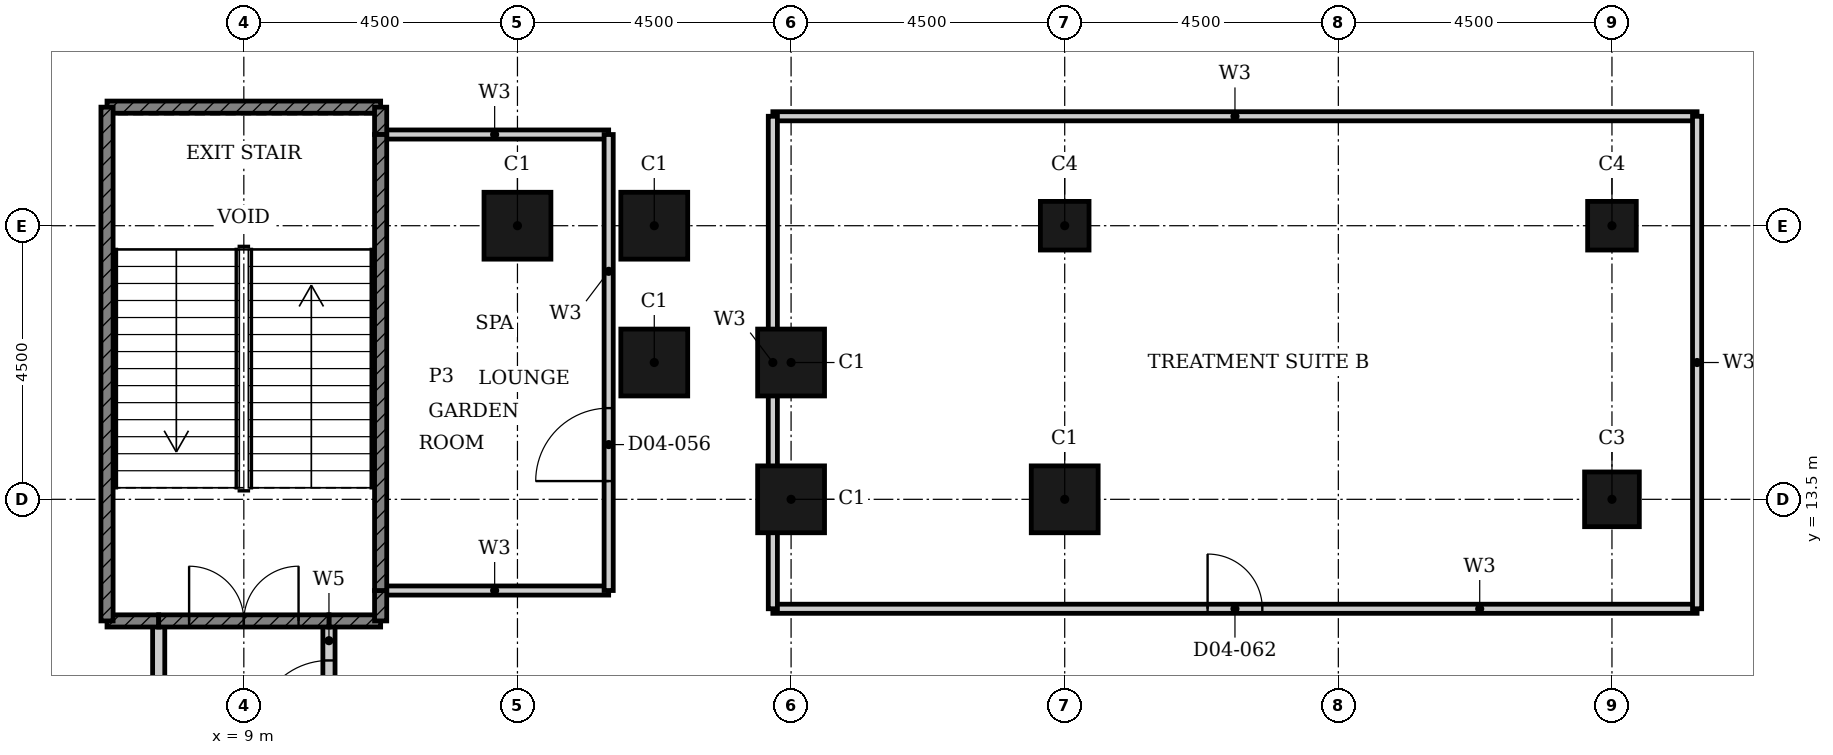
"""IFC4 building model, lengths in metres.
Left out: names, types, materials, properties, quantities, classifications, styles, units other than length and angle.
Written with IfcOpenShell. Run it as: python <this file> out.ifc"""

import sys

from ifc_helpers import new_model, si_unit, direction, frame, frame_2d, origin, origin_2d, place, context, subcontext, project, spatial, rectangle, hollow_rectangle, extrude, element, fill, save


model = new_model("IFC4")
c1 = context("Model", 3, precision=1e-05, world=origin(), true_north=direction((0.0, 1.0)))
c2 = subcontext(c1, "Body", "Model", "MODEL_VIEW")
j1 = project(units=[si_unit("LENGTHUNIT", "METRE"), si_unit("PLANEANGLEUNIT", "RADIAN")], contexts=[c1])
p1 = place(None, origin())
s1 = spatial("IfcSite", under=j1, at=p1, CompositionType="ELEMENT")
p2 = place(p1, origin())
s2 = spatial("IfcBuilding", under=s1, at=p2, CompositionType="ELEMENT")
p3 = place(p2, frame((0.0, 0.0, 24.0)))
s3 = spatial("IfcBuildingStorey", under=s2, at=p3, CompositionType="ELEMENT", Elevation=24.0)
for number, where, z_axis, x_axis in (
    (1, (13.5, 18.0, 0.0), (0.0, 0.0, 1.0), (1.0, 0.0, 0.0)),
    (2, (15.75, 18.0, 0.0), (0.0, 0.0, 1.0), (1.0, 0.0, 0.0)),
    (3, (15.75, 15.75, 0.0), (0.0, 0.0, 1.0), (1.0, 0.0, 0.0)),
    (4, (18.0, 15.75, 0.0), (0.0, 0.0, 1.0), (1.0, 0.0, 0.0)),
    (5, (18.0, 13.5, 0.0), (0.0, 0.0, 1.0), (1.0, 0.0, 0.0)),
    (6, (22.5, 13.5, 0.0), (0.0, 0.0, 1.0), (1.0, 0.0, 0.0)),
):
    element("IfcColumn", number, at=place(p3, frame(where, z_axis=z_axis, x_axis=x_axis)), inside=s3, PredefinedType="COLUMN", context=c2, shape_type="SweptSolid", body=[
        extrude(hollow_rectangle(XDim=1.1, YDim=1.1, WallThickness=0.036, at=origin_2d()), origin(), (0.0, 0.0, 1.0), 4.8),
    ])
p4 = place(p3, frame((31.5, 13.5, 0.0), z_axis=(0.0, 0.0, 1.0), x_axis=(1.0, 0.0, 0.0)))
e7 = element("IfcColumn", 7, at=p4, inside=s3, PredefinedType="COLUMN", context=c2, shape_type="SweptSolid", body=[
    extrude(hollow_rectangle(XDim=0.9, YDim=0.9, WallThickness=0.028, at=origin_2d()), origin(), (0.0, 0.0, 1.0), 4.8),
])
for number, where, z_axis, x_axis in (
    (8, (22.5, 18.0, 0.0), (0.0, 0.0, 1.0), (1.0, 0.0, 0.0)),
    (9, (31.5, 18.0, 0.0), (0.0, 0.0, 1.0), (1.0, 0.0, 0.0)),
):
    element("IfcColumn", number, at=place(p3, frame(where, z_axis=z_axis, x_axis=x_axis)), inside=s3, PredefinedType="COLUMN", context=c2, shape_type="SweptSolid", body=[
        extrude(hollow_rectangle(XDim=0.8, YDim=0.8, WallThickness=0.025, at=origin_2d()), origin(), (0.0, 0.0, 1.0), 4.8),
    ])
p5 = place(p3, frame((17.7, 11.7, 0.0), z_axis=(0.0, 0.0, 1.0), x_axis=(1.0, 0.0, 0.0)))
e10 = element("IfcWall", 10, at=p5, inside=s3, PredefinedType="PARTITIONING", context=c2, shape_type="SweptSolid", body=[
    extrude(rectangle(XDim=15.2, YDim=0.15, at=frame_2d((7.6, 0.0))), origin(), (0.0, 0.0, 1.0), 4.45),
])
p6 = place(p5, frame((7.15, 0.0, 0.0)))
e11 = element("IfcOpeningElement", 11, at=p6, cuts=e10, PredefinedType="OPENING", context=c2, shape_type="SweptSolid", body=[
    extrude(rectangle(XDim=0.9, YDim=2.1, at=frame_2d((0.45, 1.05))), frame((0.0, 0.085, 0.0), z_axis=(0.0, -1.0, 0.0), x_axis=(1.0, 0.0, 0.0)), (0.0, 0.0, 1.0), 0.17),
])
for number, where, z_axis, x_axis in (
    (12, (11.25, 12.0, 0.0), (0.0, 0.0, 1.0), (1.0, 0.0, 0.0)),
    (13, (11.25, 19.5, 0.0), (0.0, 0.0, 1.0), (1.0, 0.0, 0.0)),
):
    element("IfcWall", number, at=place(p3, frame(where, z_axis=z_axis, x_axis=x_axis)), inside=s3, PredefinedType="PARTITIONING", context=c2, shape_type="SweptSolid", body=[
        extrude(rectangle(XDim=3.75, YDim=0.15, at=frame_2d((1.875, 0.0))), origin(), (0.0, 0.0, 1.0), 4.45),
    ])
p7 = place(p3, frame((17.7, 19.8, 0.0), z_axis=(0.0, 0.0, 1.0), x_axis=(1.0, 0.0, 0.0)))
e14 = element("IfcWall", 14, at=p7, inside=s3, PredefinedType="PARTITIONING", context=c2, shape_type="SweptSolid", body=[
    extrude(rectangle(XDim=15.2, YDim=0.15, at=frame_2d((7.6, 0.0))), origin(), (0.0, 0.0, 1.0), 4.45),
])
p8 = place(p3, frame((15.0, 12.0, 0.0), z_axis=(0.0, 0.0, 1.0), x_axis=(0.0, 1.0, 0.0)))
e15 = element("IfcWall", 15, at=p8, inside=s3, PredefinedType="PARTITIONING", context=c2, shape_type="SweptSolid", body=[
    extrude(rectangle(XDim=7.5, YDim=0.15, at=frame_2d((3.75, 0.0))), origin(), (0.0, 0.0, 1.0), 4.45),
])
p9 = place(p8, frame((1.8, 0.0, 0.0)))
e16 = element("IfcOpeningElement", 16, at=p9, cuts=e15, PredefinedType="OPENING", context=c2, shape_type="SweptSolid", body=[
    extrude(rectangle(XDim=1.2, YDim=2.4, at=frame_2d((0.6, 1.2))), frame((0.0, 0.085, 0.0), z_axis=(0.0, -1.0, 0.0), x_axis=(1.0, 0.0, 0.0)), (0.0, 0.0, 1.0), 0.17),
])
for number, where, z_axis, x_axis in (
    (17, (17.7, 11.7, 0.0), (0.0, 0.0, 1.0), (0.0, 1.0, 0.0)),
    (18, (32.9, 11.7, 0.0), (0.0, 0.0, 1.0), (0.0, 1.0, 0.0)),
):
    element("IfcWall", number, at=place(p3, frame(where, z_axis=z_axis, x_axis=x_axis)), inside=s3, PredefinedType="PARTITIONING", context=c2, shape_type="SweptSolid", body=[
        extrude(rectangle(XDim=8.1, YDim=0.15, at=frame_2d((4.05, 0.0))), origin(), (0.0, 0.0, 1.0), 4.45),
    ])
p10 = place(p3, frame((10.4, 9.0, 0.0), z_axis=(0.0, 0.0, 1.0), x_axis=(0.0, 1.0, 0.0)))
e19 = element("IfcWall", 19, at=p10, inside=s3, PredefinedType="PARTITIONING", context=c2, shape_type="SweptSolid", body=[
    extrude(rectangle(XDim=2.5, YDim=0.2, at=frame_2d((1.25, 0.0))), origin(), (0.0, 0.0, 1.0), 4.45),
])
p11 = place(p10, frame((0.65, 0.0, 0.0)))
e20 = element("IfcOpeningElement", 20, at=p11, cuts=e19, PredefinedType="OPENING", context=c2, shape_type="SweptSolid", body=[
    extrude(rectangle(XDim=1.2, YDim=2.1, at=frame_2d((0.6, 1.05))), frame((0.0, 0.11, 0.0), z_axis=(0.0, -1.0, 0.0), x_axis=(1.0, 0.0, 0.0)), (0.0, 0.0, 1.0), 0.22),
])
p12 = place(p3, frame((7.6, 9.0, 0.0), z_axis=(0.0, 0.0, 1.0), x_axis=(0.0, 1.0, 0.0)))
e21 = element("IfcWall", 21, at=p12, inside=s3, PredefinedType="PARTITIONING", context=c2, shape_type="SweptSolid", body=[
    extrude(rectangle(XDim=2.5, YDim=0.2, at=frame_2d((1.25, 0.0))), origin(), (0.0, 0.0, 1.0), 4.45),
])
for number, where, z_axis, x_axis in (
    (22, (6.75, 11.5, 0.0), (0.0, 0.0, 1.0), (1.0, 0.0, 0.0)),
    (23, (10.4, 11.5, 0.0), (0.0, 0.0, 1.0), (1.0, 0.0, 0.0)),
):
    element("IfcWall", number, at=place(p3, frame(where, z_axis=z_axis, x_axis=x_axis)), inside=s3, PredefinedType="SHEAR", context=c2, shape_type="SweptSolid", body=[
        extrude(rectangle(XDim=0.85, YDim=0.2, at=frame_2d((0.425, 0.0))), origin(), (0.0, 0.0, 1.0), 4.45),
    ])
p13 = place(p3, frame((7.6, 11.5, 0.0), z_axis=(0.0, 0.0, 1.0), x_axis=(1.0, 0.0, 0.0)))
e24 = element("IfcWall", 24, at=p13, inside=s3, PredefinedType="SHEAR", context=c2, shape_type="SweptSolid", body=[
    extrude(rectangle(XDim=2.8, YDim=0.2, at=frame_2d((1.4, 0.0))), origin(), (0.0, 0.0, 1.0), 4.45),
])
p14 = place(p13, frame((0.5, 0.0, 0.0)))
e25 = element("IfcOpeningElement", 25, at=p14, cuts=e24, PredefinedType="OPENING", context=c2, shape_type="SweptSolid", body=[
    extrude(rectangle(XDim=1.8, YDim=2.1, at=frame_2d((0.9, 1.05))), frame((0.0, 0.11, 0.0), z_axis=(0.0, -1.0, 0.0), x_axis=(1.0, 0.0, 0.0)), (0.0, 0.0, 1.0), 0.22),
])
p15 = place(p3, frame((6.75, 19.95, 0.0), z_axis=(0.0, 0.0, 1.0), x_axis=(1.0, 0.0, 0.0)))
e26 = element("IfcWall", 26, at=p15, inside=s3, PredefinedType="SHEAR", context=c2, shape_type="SweptSolid", body=[
    extrude(rectangle(XDim=4.5, YDim=0.2, at=frame_2d((2.25, 0.0))), origin(), (0.0, 0.0, 1.0), 4.45),
])
p16 = place(p3, frame((11.25, 11.5, 0.0), z_axis=(0.0, 0.0, 1.0), x_axis=(0.0, 1.0, 0.0)))
e27 = element("IfcWall", 27, at=p16, inside=s3, PredefinedType="SHEAR", context=c2, shape_type="SweptSolid", body=[
    extrude(rectangle(XDim=0.5, YDim=0.2, at=frame_2d((0.25, 0.0))), origin(), (0.0, 0.0, 1.0), 4.45),
])
p17 = place(p3, frame((11.25, 19.5, 0.0), z_axis=(0.0, 0.0, 1.0), x_axis=(0.0, 1.0, 0.0)))
e28 = element("IfcWall", 28, at=p17, inside=s3, PredefinedType="SHEAR", context=c2, shape_type="SweptSolid", body=[
    extrude(rectangle(XDim=0.45, YDim=0.2, at=frame_2d((0.225, 0.0))), origin(), (0.0, 0.0, 1.0), 4.45),
])
p18 = place(p3, frame((11.25, 12.0, 0.0), z_axis=(0.0, 0.0, 1.0), x_axis=(0.0, 1.0, 0.0)))
e29 = element("IfcWall", 29, at=p18, inside=s3, PredefinedType="SHEAR", context=c2, shape_type="SweptSolid", body=[
    extrude(rectangle(XDim=7.5, YDim=0.2, at=frame_2d((3.75, 0.0))), origin(), (0.0, 0.0, 1.0), 4.45),
])
p19 = place(p3, frame((6.75, 11.5, 0.0), z_axis=(0.0, 0.0, 1.0), x_axis=(0.0, 1.0, 0.0)))
e30 = element("IfcWall", 30, at=p19, inside=s3, PredefinedType="SHEAR", context=c2, shape_type="SweptSolid", body=[
    extrude(rectangle(XDim=8.45, YDim=0.2, at=frame_2d((4.225, 0.0))), origin(), (0.0, 0.0, 1.0), 4.45),
])
p20 = place(p11, origin())
e31 = element("IfcDoor", 31, at=p20, inside=s3, OperationType="SINGLE_SWING_LEFT", PredefinedType="DOOR", context=c2, shape_type="SweptSolid", body=[
    extrude(rectangle(XDim=1.2, YDim=2.1, at=frame_2d((0.6, 1.05))), frame((0.0, 0.025, 0.0), z_axis=(0.0, -1.0, 0.0), x_axis=(1.0, 0.0, 0.0)), (0.0, 0.0, 1.0), 0.05),
])
fill(e20, e31)
p21 = place(p14, origin())
e32 = element("IfcDoor", 32, at=p21, inside=s3, OperationType="DOUBLE_DOOR_SINGLE_SWING", PredefinedType="DOOR", context=c2, shape_type="SweptSolid", body=[
    extrude(rectangle(XDim=1.8, YDim=2.1, at=frame_2d((0.9, 1.05))), frame((0.0, 0.025, 0.0), z_axis=(0.0, -1.0, 0.0), x_axis=(1.0, 0.0, 0.0)), (0.0, 0.0, 1.0), 0.05),
])
fill(e25, e32)
p22 = place(p9, origin())
e33 = element("IfcDoor", 33, at=p22, inside=s3, OperationType="SINGLE_SWING_LEFT", PredefinedType="DOOR", context=c2, shape_type="SweptSolid", body=[
    extrude(rectangle(XDim=1.2, YDim=2.4, at=frame_2d((0.6, 1.2))), frame((0.0, 0.025, 0.0), z_axis=(0.0, -1.0, 0.0), x_axis=(1.0, 0.0, 0.0)), (0.0, 0.0, 1.0), 0.05),
])
fill(e16, e33)
p23 = place(p6, origin())
e34 = element("IfcDoor", 34, at=p23, inside=s3, OperationType="SINGLE_SWING_RIGHT", PredefinedType="DOOR", context=c2, shape_type="SweptSolid", body=[
    extrude(rectangle(XDim=0.9, YDim=2.1, at=frame_2d((0.45, 1.05))), frame((0.0, 0.025, 0.0), z_axis=(0.0, -1.0, 0.0), x_axis=(1.0, 0.0, 0.0)), (0.0, 0.0, 1.0), 0.05),
])
fill(e11, e34)
save(model, sys.argv[1])
